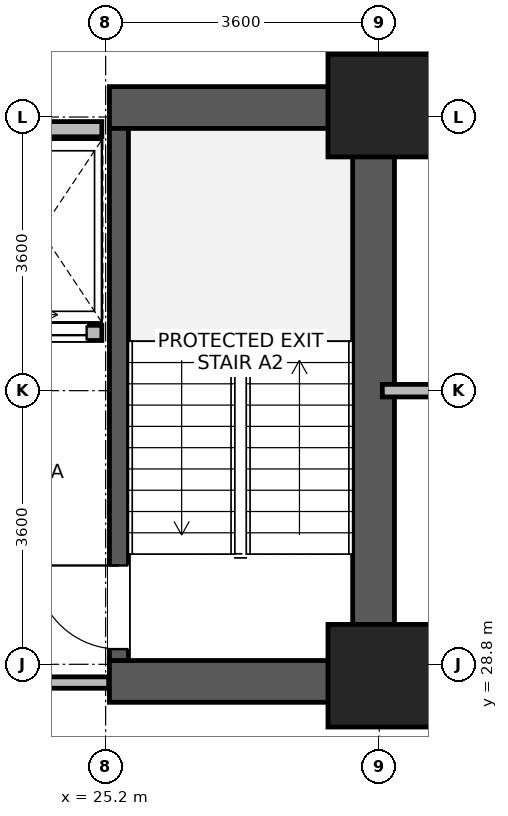
"""IFC4 building model, lengths in metres.
Left out: names, types, materials, properties, quantities, classifications, styles, units other than length and angle.
Written with IfcOpenShell. Run it as: python <this file> out.ifc"""

import sys

from ifc_helpers import new_model, si_unit, direction, frame, frame_2d, origin, origin_2d, place, context, subcontext, project, spatial, rectangle, extrude, source, transform, mapped, element, fill, save


model = new_model("IFC4")
c1 = context("Model", 3, precision=1e-05, world=origin(), true_north=direction((0.0, 1.0)))
c2 = subcontext(c1, "Body", "Model", "MODEL_VIEW")
j1 = project(units=[si_unit("LENGTHUNIT", "METRE"), si_unit("PLANEANGLEUNIT", "RADIAN")], contexts=[c1])
p1 = place(None, origin())
s1 = spatial("IfcSite", under=j1, at=p1, CompositionType="ELEMENT")
p2 = place(p1, origin())
s2 = spatial("IfcBuilding", under=s1, at=p2, CompositionType="ELEMENT")
p3 = place(p2, frame((0.0, 0.0, 54.9)))
s3 = spatial("IfcBuildingStorey", under=s2, at=p3, CompositionType="ELEMENT", Elevation=54.9)
p4 = place(p3, frame((28.725, 28.3, 0.0), z_axis=(0.0, 0.0, 1.0), x_axis=(0.0, 1.0, 0.0)))
e1 = element("IfcWall", 1, at=p4, inside=s3, PredefinedType="SHEAR", context=c2, shape_type="SweptSolid", body=[
    extrude(rectangle(XDim=8.1, YDim=0.55, at=frame_2d((4.05, 0.0))), origin(), (0.0, 0.0, 1.0), 3.45),
])
for number, where, z_axis, x_axis in (
    (2, (25.25, 28.575, 0.0), (0.0, 0.0, 1.0), (1.0, 0.0, 0.0)),
    (3, (25.25, 36.125, 0.0), (0.0, 0.0, 1.0), (1.0, 0.0, 0.0)),
):
    element("IfcWall", number, at=place(p3, frame(where, z_axis=z_axis, x_axis=x_axis)), inside=s3, PredefinedType="SHEAR", context=c2, shape_type="SweptSolid", body=[
        extrude(rectangle(XDim=3.2, YDim=0.55, at=frame_2d((1.6, 0.0))), origin(), (0.0, 0.0, 1.0), 3.45),
    ])
p5 = place(p3, frame((25.375, 28.85, 0.0), z_axis=(0.0, 0.0, 1.0), x_axis=(0.0, 1.0, 0.0)))
e4 = element("IfcWall", 4, at=p5, inside=s3, PredefinedType="SHEAR", context=c2, shape_type="SweptSolid", body=[
    extrude(rectangle(XDim=7.0, YDim=0.25, at=frame_2d((3.5, 0.0))), origin(), (0.0, 0.0, 1.0), 3.45),
])
p6 = place(p5, frame((0.15, 0.0, 0.0)))
e5 = element("IfcOpeningElement", 5, at=p6, cuts=e4, PredefinedType="OPENING", context=c2, shape_type="SweptSolid", body=[
    extrude(rectangle(XDim=1.1, YDim=2.08, at=frame_2d((0.55, 1.04))), frame((0.0, 0.135, 0.0), z_axis=(0.0, -1.0, 0.0), x_axis=(1.0, 0.0, 0.0)), (0.0, 0.0, 1.0), 0.27),
])
m1 = source(origin(), c2, "Body", "SweptSolid", [
    extrude(rectangle(XDim=1.35, YDim=1.35, at=origin_2d()), origin(), (0.0, 0.0, 1.0), 3.7),
])
for number, where, z_axis, x_axis in (
    (6, (28.8, 28.65, 0.0), (0.0, 0.0, 1.0), (1.0, 0.0, 0.0)),
    (7, (28.8, 36.15, 0.0), (0.0, 0.0, 1.0), (1.0, 0.0, 0.0)),
):
    element("IfcColumn", number, at=place(p3, frame(where, z_axis=z_axis, x_axis=x_axis)), inside=s3, PredefinedType="COLUMN", context=c2, shape_type="MappedRepresentation", body=[
        mapped(m1, transform((0.0, 0.0, 0.0), x_axis=(1.0, 0.0, 0.0), y_axis=(0.0, 1.0, 0.0), z_axis=(0.0, 0.0, 1.0), scale=1.0)),
    ])
p7 = place(p3, frame((23.55, 33.16, 0.0), z_axis=(0.0, 0.0, 1.0), x_axis=(1.0, 0.0, 0.0)))
e8 = element("IfcWall", 8, at=p7, inside=s3, PredefinedType="PARTITIONING", context=c2, shape_type="SweptSolid", body=[
    extrude(rectangle(XDim=1.6, YDim=0.2, at=frame_2d((0.8, 0.0))), origin(), (0.0, 0.0, 1.0), 3.43),
])
p8 = place(p7, frame((0.2, 0.0, 0.0)))
e9 = element("IfcOpeningElement", 9, at=p8, cuts=e8, PredefinedType="OPENING", context=c2, shape_type="SweptSolid", body=[
    extrude(rectangle(XDim=1.2, YDim=2.12, at=frame_2d((0.6, 1.06))), frame((0.0, 0.11, 0.0), z_axis=(0.0, -1.0, 0.0), x_axis=(1.0, 0.0, 0.0)), (0.0, 0.0, 1.0), 0.22),
])
p9 = place(p3, frame((23.55, 35.84, 0.0), z_axis=(0.0, 0.0, 1.0), x_axis=(1.0, 0.0, 0.0)))
e10 = element("IfcWall", 10, at=p9, inside=s3, PredefinedType="PARTITIONING", context=c2, shape_type="SweptSolid", body=[
    extrude(rectangle(XDim=1.6, YDim=0.2, at=frame_2d((0.8, 0.0))), origin(), (0.0, 0.0, 1.0), 2.23),
])
p10 = place(p3, frame((28.84, 32.4, 0.0), z_axis=(0.0, 0.0, 1.0), x_axis=(1.0, 0.0, 0.0)))
e11 = element("IfcWall", 11, at=p10, inside=s3, PredefinedType="PARTITIONING", context=c2, shape_type="SweptSolid", body=[
    extrude(rectangle(XDim=4.52, YDim=0.165, at=frame_2d((2.26, 0.0))), origin(), (0.0, 0.0, 1.0), 3.43),
])
p11 = place(p3, frame((21.76, 28.56, 0.0), z_axis=(0.0, 0.0, 1.0), x_axis=(1.0, 0.0, 0.0)))
e12 = element("IfcWall", 12, at=p11, inside=s3, PredefinedType="PARTITIONING", context=c2, shape_type="SweptSolid", body=[
    extrude(rectangle(XDim=3.48, YDim=0.15, at=frame_2d((1.74, 0.0))), origin(), (0.0, 0.0, 1.0), 2.23),
])
p12 = place(p6, origin())
e13 = element("IfcDoor", 13, at=p12, inside=s3, OperationType="SINGLE_SWING_RIGHT", PredefinedType="DOOR", context=c2, shape_type="SweptSolid", body=[
    extrude(rectangle(XDim=1.1, YDim=2.08, at=frame_2d((0.55, 1.04))), frame((0.0, 0.025, 0.0), z_axis=(0.0, -1.0, 0.0), x_axis=(1.0, 0.0, 0.0)), (0.0, 0.0, 1.0), 0.05),
])
fill(e5, e13)
p13 = place(p8, origin())
e14 = element("IfcDoor", 14, at=p13, inside=s3, OperationType="SLIDING_TO_RIGHT", PredefinedType="DOOR", context=c2, shape_type="SweptSolid", body=[
    extrude(rectangle(XDim=1.2, YDim=2.12, at=frame_2d((0.6, 1.06))), frame((0.0, 0.025, 0.0), z_axis=(0.0, -1.0, 0.0), x_axis=(1.0, 0.0, 0.0)), (0.0, 0.0, 1.0), 0.05),
])
fill(e9, e14)
save(model, sys.argv[1])
